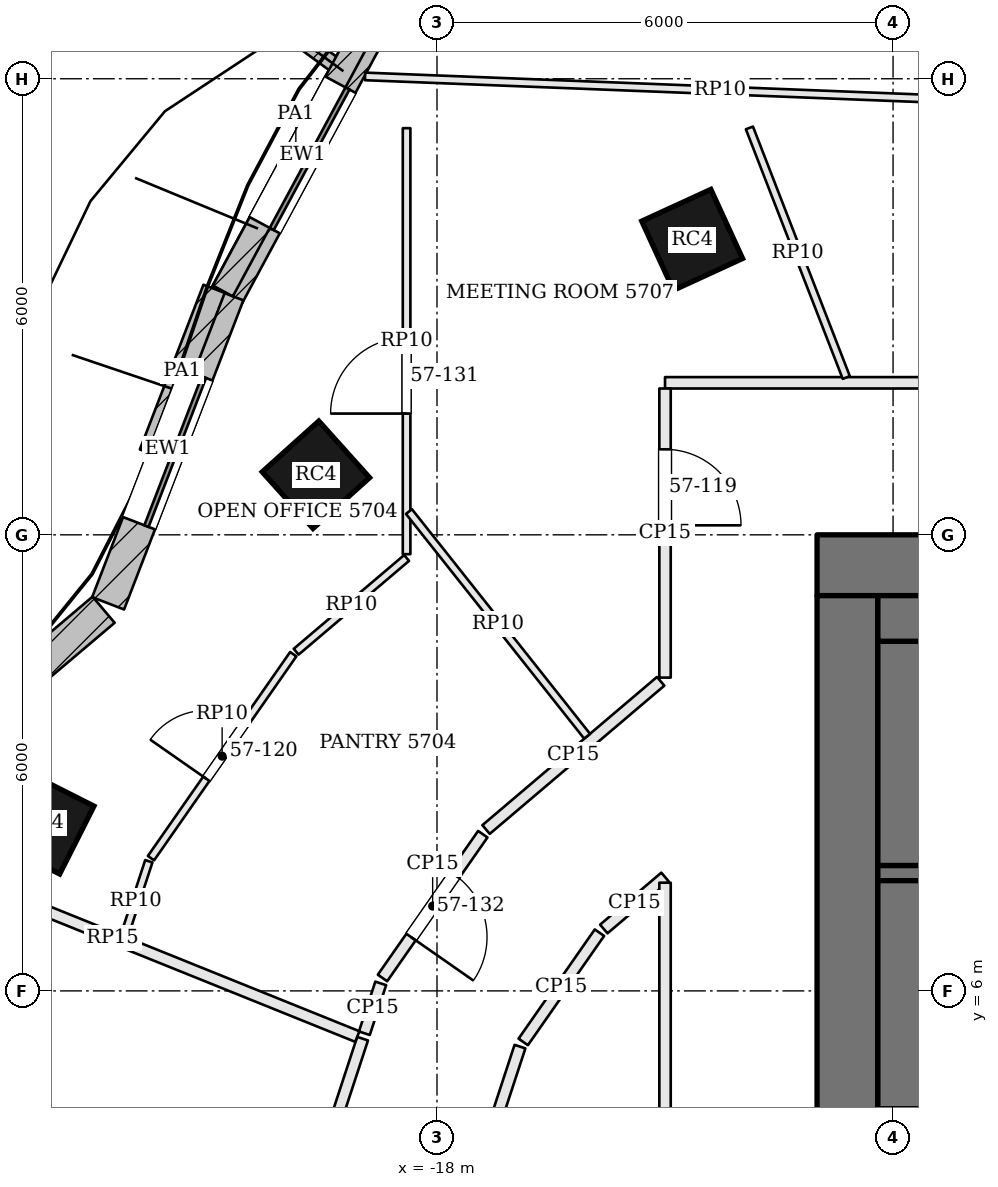
"""IFC4 building model, lengths in metres.
Left out: names, types, materials, properties, quantities, classifications, styles, units other than length and angle.
Written with IfcOpenShell. Run it as: python <this file> out.ifc"""

import sys

from ifc_helpers import new_model, si_unit, direction, frame, frame_2d, origin, origin_2d, place, context, subcontext, project, spatial, rectangle, extrude, element, fill, save


model = new_model("IFC4")
c1 = context("Model", 3, precision=1e-05, world=origin(), true_north=direction((0.0, 1.0)))
c2 = subcontext(c1, "Body", "Model", "MODEL_VIEW")
j1 = project(units=[si_unit("LENGTHUNIT", "METRE"), si_unit("PLANEANGLEUNIT", "RADIAN")], contexts=[c1])
p1 = place(None, origin())
s1 = spatial("IfcSite", under=j1, at=p1, CompositionType="ELEMENT")
p2 = place(p1, origin())
s2 = spatial("IfcBuilding", under=s1, at=p2, CompositionType="ELEMENT")
p3 = place(p2, frame((0.0, 0.0, 233.1)))
s3 = spatial("IfcBuildingStorey", under=s2, at=p3, CompositionType="ELEMENT", Elevation=233.1)
p4 = place(p3, frame((-13.0, 11.6, 0.0), z_axis=(0.0, 0.0, 1.0), x_axis=(1.0, 0.0, 0.0)))
e1 = element("IfcWall", 1, at=p4, inside=s3, PredefinedType="SHEAR", context=c2, shape_type="SweptSolid", body=[
    extrude(rectangle(XDim=26.0, YDim=0.8, at=frame_2d((13.0, 0.0))), origin(), (0.0, 0.0, 1.0), 3.9),
])
p5 = place(p4, frame((8.825, 0.0, 0.0)))
e2 = element("IfcOpeningElement", 2, at=p5, cuts=e1, PredefinedType="OPENING", context=c2, shape_type="SweptSolid", body=[
    extrude(rectangle(XDim=1.0, YDim=2.1, at=frame_2d((0.5, 1.05))), frame((0.0, 0.41, 0.0), z_axis=(0.0, -1.0, 0.0), x_axis=(1.0, 0.0, 0.0)), (0.0, 0.0, 1.0), 0.82),
])
p6 = place(p4, frame((11.825, 0.0, 0.0)))
e3 = element("IfcOpeningElement", 3, at=p6, cuts=e1, PredefinedType="OPENING", context=c2, shape_type="SweptSolid", body=[
    extrude(rectangle(XDim=0.7, YDim=2.1, at=frame_2d((0.35, 1.05))), frame((0.0, 0.41, 0.0), z_axis=(0.0, -1.0, 0.0), x_axis=(1.0, 0.0, 0.0)), (0.0, 0.0, 1.0), 0.82),
])
p7 = place(p4, frame((14.275, 0.0, 0.0)))
e4 = element("IfcOpeningElement", 4, at=p7, cuts=e1, PredefinedType="OPENING", context=c2, shape_type="SweptSolid", body=[
    extrude(rectangle(XDim=0.7, YDim=2.1, at=frame_2d((0.35, 1.05))), frame((0.0, 0.41, 0.0), z_axis=(0.0, -1.0, 0.0), x_axis=(1.0, 0.0, 0.0)), (0.0, 0.0, 1.0), 0.82),
])
p8 = place(p4, frame((16.175, 0.0, 0.0)))
e5 = element("IfcOpeningElement", 5, at=p8, cuts=e1, PredefinedType="OPENING", context=c2, shape_type="SweptSolid", body=[
    extrude(rectangle(XDim=1.0, YDim=2.1, at=frame_2d((0.5, 1.05))), frame((0.0, 0.41, 0.0), z_axis=(0.0, -1.0, 0.0), x_axis=(1.0, 0.0, 0.0)), (0.0, 0.0, 1.0), 0.82),
])
p9 = place(p3, frame((-12.6, -2.2, 0.0), z_axis=(0.0, 0.0, 1.0), x_axis=(0.0, 1.0, 0.0)))
e6 = element("IfcWall", 6, at=p9, inside=s3, PredefinedType="SHEAR", context=c2, shape_type="SweptSolid", body=[
    extrude(rectangle(XDim=13.4, YDim=0.8, at=frame_2d((6.7, 0.0))), origin(), (0.0, 0.0, 1.0), 3.9),
])
p10 = place(p9, frame((4.2, 0.0, 0.0)))
e7 = element("IfcOpeningElement", 7, at=p10, cuts=e6, PredefinedType="OPENING", context=c2, shape_type="SweptSolid", body=[
    extrude(rectangle(XDim=1.8, YDim=2.1, at=frame_2d((0.9, 1.05))), frame((0.0, 0.41, 0.0), z_axis=(0.0, -1.0, 0.0), x_axis=(1.0, 0.0, 0.0)), (0.0, 0.0, 1.0), 0.82),
])
for number, where, z_axis, x_axis in (
    (8, (-14.643, 15.881, 0.0), (0.0, 0.0, 1.0), (-0.909, -0.417, 0.0)),
    (9, (-19.593, 12.79, 0.0), (0.0, 0.0, 1.0), (-0.744, -0.668, 0.0)),
    (10, (-23.185, 8.21, 0.0), (0.0, 0.0, 1.0), (-0.451, -0.893, 0.0)),
):
    element("IfcColumn", number, at=place(p3, frame(where, z_axis=z_axis, x_axis=x_axis)), inside=s3, PredefinedType="COLUMN", context=c2, shape_type="SweptSolid", body=[
        extrude(rectangle(XDim=1.0, YDim=1.0, at=origin_2d()), origin(), (0.0, 0.0, 1.0), 3.9),
    ])
p11 = place(p3, frame((-18.767, 18.854, 0.0), z_axis=(0.0, 0.0, 1.0), x_axis=(-0.474475888716, -0.880268499395, 0.0)))
e11 = element("IfcWall", 11, at=p11, inside=s3, PredefinedType="SOLIDWALL", context=c2, shape_type="SweptSolid", body=[
    extrude(rectangle(XDim=4.219, YDim=0.45, at=frame_2d((2.11, 0.0))), origin(), (0.0, 0.0, 1.0), 3.7),
])
p12 = place(p11, frame((1.06, 0.0, 0.9)))
e12 = element("IfcOpeningElement", 12, at=p12, cuts=e11, PredefinedType="OPENING", context=c2, shape_type="SweptSolid", body=[
    extrude(rectangle(XDim=2.1, YDim=2.3, at=frame_2d((1.05, 1.15))), frame((0.0, 0.235, 0.0), z_axis=(0.0, -1.0, 0.0), x_axis=(1.0, 0.0, 0.0)), (0.0, 0.0, 1.0), 0.47),
])
p13 = place(p3, frame((-20.757, 15.166, 0.0), z_axis=(0.0, 0.0, 1.0), x_axis=(-0.360067043581, -0.932926430179, 0.0)))
e13 = element("IfcWall", 13, at=p13, inside=s3, PredefinedType="SOLIDWALL", context=c2, shape_type="SweptSolid", body=[
    extrude(rectangle(XDim=4.36, YDim=0.45, at=frame_2d((2.18, 0.0))), origin(), (0.0, 0.0, 1.0), 3.7),
])
p14 = place(p13, frame((1.13, 0.0, 0.9)))
e14 = element("IfcOpeningElement", 14, at=p14, cuts=e13, PredefinedType="OPENING", context=c2, shape_type="SweptSolid", body=[
    extrude(rectangle(XDim=2.1, YDim=2.3, at=frame_2d((1.05, 1.15))), frame((0.0, 0.235, 0.0), z_axis=(0.0, -1.0, 0.0), x_axis=(1.0, 0.0, 0.0)), (0.0, 0.0, 1.0), 0.47),
])
p15 = place(p3, frame((-22.386, 11.014, 0.0), z_axis=(0.0, 0.0, 1.0), x_axis=(-0.763569952162, -0.645725118108, 0.0)))
e15 = element("IfcWall", 15, at=p15, inside=s3, PredefinedType="SOLIDWALL", context=c2, shape_type="SweptSolid", body=[
    extrude(rectangle(XDim=4.386, YDim=0.45, at=frame_2d((2.193, 0.0))), origin(), (0.0, 0.0, 1.0), 3.7),
])
p16 = place(p15, frame((1.143, 0.0, 0.9)))
e16 = element("IfcOpeningElement", 16, at=p16, cuts=e15, PredefinedType="OPENING", context=c2, shape_type="SweptSolid", body=[
    extrude(rectangle(XDim=2.1, YDim=2.3, at=frame_2d((1.05, 1.15))), frame((0.0, 0.235, 0.0), z_axis=(0.0, -1.0, 0.0), x_axis=(1.0, 0.0, 0.0)), (0.0, 0.0, 1.0), 0.47),
])
p17 = place(p3, frame((-19.231, 18.099, 0.0), z_axis=(0.0, 0.0, 1.0), x_axis=(-0.806085538754, 0.591799040394, 0.0)))
e17 = element("IfcWall", 17, at=p17, inside=s3, PredefinedType="SOLIDWALL", context=c2, shape_type="SweptSolid", body=[
    extrude(rectangle(XDim=1.75, YDim=0.2, at=frame_2d((0.875, 0.0))), origin(), (0.0, 0.0, 1.0), 3.7),
])
p18 = place(p3, frame((-18.896, 18.773, 3.9), z_axis=(0.0, 0.0, 1.0), x_axis=(-0.474444905835, -0.880285198857, 0.0)))
e18 = element("IfcWall", 18, at=p18, inside=s3, PredefinedType="PARAPET", context=c2, shape_type="SweptSolid", body=[
    extrude(rectangle(XDim=4.05, YDim=0.3, at=frame_2d((2.025, 0.0))), origin(), (0.0, 0.0, 1.0), 1.1),
])
p19 = place(p3, frame((-20.933, 15.237, 3.9), z_axis=(0.0, 0.0, 1.0), x_axis=(-0.360021038217, -0.932944184848, 0.0)))
e19 = element("IfcWall", 19, at=p19, inside=s3, PredefinedType="PARAPET", context=c2, shape_type="SweptSolid", body=[
    extrude(rectangle(XDim=2.323, YDim=0.3, at=frame_2d((1.162, 0.0))), origin(), (0.0, 0.0, 1.0), 1.1),
])
p20 = place(p3, frame((-12.2, 7.525, 0.0), z_axis=(0.0, 0.0, 1.0), x_axis=(1.0, 0.0, 0.0)))
e20 = element("IfcWall", 20, at=p20, inside=s3, PredefinedType="SOLIDWALL", context=c2, shape_type="SweptSolid", body=[
    extrude(rectangle(XDim=7.1, YDim=0.25, at=frame_2d((3.55, 0.0))), origin(), (0.0, 0.0, 1.0), 3.7),
])
p21 = place(p20, frame((5.8, 0.0, 0.0)))
e21 = element("IfcOpeningElement", 21, at=p21, cuts=e20, PredefinedType="OPENING", context=c2, shape_type="SweptSolid", body=[
    extrude(rectangle(XDim=1.2, YDim=2.1, at=frame_2d((0.6, 1.05))), frame((0.0, 0.135, 0.0), z_axis=(0.0, -1.0, 0.0), x_axis=(1.0, 0.0, 0.0)), (0.0, 0.0, 1.0), 0.27),
])
p22 = place(p3, frame((-11.9, 4.45, 0.0), z_axis=(0.0, 0.0, 1.0), x_axis=(0.0, 1.0, 0.0)))
e22 = element("IfcWall", 22, at=p22, inside=s3, PredefinedType="SOLIDWALL", context=c2, shape_type="SweptSolid", body=[
    extrude(rectangle(XDim=3.0, YDim=0.6, at=frame_2d((1.5, 0.0))), origin(), (0.0, 0.0, 1.0), 3.7),
])
p23 = place(p3, frame((-11.9, 7.65, 0.0), z_axis=(0.0, 0.0, 1.0), x_axis=(0.0, 1.0, 0.0)))
e23 = element("IfcWall", 23, at=p23, inside=s3, PredefinedType="SOLIDWALL", context=c2, shape_type="SweptSolid", body=[
    extrude(rectangle(XDim=2.95, YDim=0.6, at=frame_2d((1.475, 0.0))), origin(), (0.0, 0.0, 1.0), 3.7),
])
p24 = place(p3, frame((-12.2, 10.9, 0.0), z_axis=(0.0, 0.0, 1.0), x_axis=(1.0, 0.0, 0.0)))
e24 = element("IfcWall", 24, at=p24, inside=s3, PredefinedType="SOLIDWALL", context=c2, shape_type="SweptSolid", body=[
    extrude(rectangle(XDim=7.1, YDim=0.6, at=frame_2d((3.55, 0.0))), origin(), (0.0, 0.0, 1.0), 3.7),
])
p25 = place(p3, frame((-18.979, 5.372, 0.0), z_axis=(0.0, 0.0, 1.0), x_axis=(-0.311873415846, -0.950123661682, 0.0)))
e25 = element("IfcWall", 25, at=p25, inside=s3, PredefinedType="PARTITIONING", context=c2, shape_type="SweptSolid", body=[
    extrude(rectangle(XDim=2.441, YDim=0.15, at=frame_2d((1.22, 0.0))), origin(), (0.0, 0.0, 1.0), 3.084),
])
p26 = place(p3, frame((-25.486, 7.995, 0.0), z_axis=(0.0, 0.0, 1.0), x_axis=(0.927464099257, -0.373912215083, 0.0)))
e26 = element("IfcWall", 26, at=p26, inside=s3, PredefinedType="PARTITIONING", context=c2, shape_type="SweptSolid", body=[
    extrude(rectangle(XDim=6.941, YDim=0.15, at=frame_2d((3.47, 0.0))), origin(), (0.0, 0.0, 1.0), 3.084),
])
p27 = place(p3, frame((-2.837, 14.0, 0.0), z_axis=(0.0, 0.0, 1.0), x_axis=(-1.0, 0.0, 0.0)))
e27 = element("IfcWall", 27, at=p27, inside=s3, PredefinedType="PARTITIONING", context=c2, shape_type="SweptSolid", body=[
    extrude(rectangle(XDim=12.163, YDim=0.15, at=frame_2d((6.082, 0.0))), origin(), (0.0, 0.0, 1.0), 3.084),
])
p28 = place(p27, frame((3.938, 0.0, 0.0)))
e28 = element("IfcOpeningElement", 28, at=p28, cuts=e27, PredefinedType="OPENING", context=c2, shape_type="SweptSolid", body=[
    extrude(rectangle(XDim=1.8, YDim=2.1, at=frame_2d((0.9, 1.05))), frame((0.0, 0.085, 0.0), z_axis=(0.0, -1.0, 0.0), x_axis=(1.0, 0.0, 0.0)), (0.0, 0.0, 1.0), 0.17),
])
p29 = place(p3, frame((-15.0, 13.925, 0.0), z_axis=(0.0, 0.0, 1.0), x_axis=(0.0, -1.0, 0.0)))
e29 = element("IfcWall", 29, at=p29, inside=s3, PredefinedType="PARTITIONING", context=c2, shape_type="SweptSolid", body=[
    extrude(rectangle(XDim=3.803, YDim=0.15, at=frame_2d((1.902, 0.0))), origin(), (0.0, 0.0, 1.0), 3.084),
])
p30 = place(p29, frame((0.8, 0.0, 0.0)))
e30 = element("IfcOpeningElement", 30, at=p30, cuts=e29, PredefinedType="OPENING", context=c2, shape_type="SweptSolid", body=[
    extrude(rectangle(XDim=1.0, YDim=2.4, at=frame_2d((0.5, 1.2))), frame((0.0, 0.085, 0.0), z_axis=(0.0, -1.0, 0.0), x_axis=(1.0, 0.0, 0.0)), (0.0, 0.0, 1.0), 0.17),
])
p31 = place(p3, frame((-15.057, 10.073, 0.0), z_axis=(0.0, 0.0, 1.0), x_axis=(-0.762398905861, -0.647107339119, 0.0)))
e31 = element("IfcWall", 31, at=p31, inside=s3, PredefinedType="PARTITIONING", context=c2, shape_type="SweptSolid", body=[
    extrude(rectangle(XDim=3.013, YDim=0.15, at=frame_2d((1.507, 0.0))), origin(), (0.0, 0.0, 1.0), 3.084),
])
p32 = place(p3, frame((-17.397, 8.062, 0.0), z_axis=(0.0, 0.0, 1.0), x_axis=(-0.572118665737, -0.820170855563, 0.0)))
e32 = element("IfcWall", 32, at=p32, inside=s3, PredefinedType="PARTITIONING", context=c2, shape_type="SweptSolid", body=[
    extrude(rectangle(XDim=2.306, YDim=0.15, at=frame_2d((1.153, 0.0))), origin(), (0.0, 0.0, 1.0), 3.084),
])
p33 = place(p32, frame((0.65, 0.0, 0.0)))
e33 = element("IfcOpeningElement", 33, at=p33, cuts=e32, PredefinedType="OPENING", context=c2, shape_type="SweptSolid", body=[
    extrude(rectangle(XDim=1.0, YDim=2.1, at=frame_2d((0.5, 1.05))), frame((0.0, 0.085, 0.0), z_axis=(0.0, -1.0, 0.0), x_axis=(1.0, 0.0, 0.0)), (0.0, 0.0, 1.0), 0.17),
])
p34 = place(p3, frame((-18.74, 6.099, 0.0), z_axis=(0.0, 0.0, 1.0), x_axis=(-0.311875163268, -0.950123088098, 0.0)))
e34 = element("IfcWall", 34, at=p34, inside=s3, PredefinedType="PARTITIONING", context=c2, shape_type="SweptSolid", body=[
    extrude(rectangle(XDim=0.69, YDim=0.15, at=frame_2d((0.345, 0.0))), origin(), (0.0, 0.0, 1.0), 3.084),
])
p35 = place(p3, frame((-17.739, 2.738, 0.0), z_axis=(0.0, 0.0, 1.0), x_axis=(0.311904957484, 0.950113307715, 0.0)))
e35 = element("IfcWall", 35, at=p35, inside=s3, PredefinedType="PARTITIONING", context=c2, shape_type="SweptSolid", body=[
    extrude(rectangle(XDim=2.662, YDim=0.15, at=frame_2d((1.331, 0.0))), origin(), (0.0, 0.0, 1.0), 3.084),
])
p36 = place(p3, frame((-16.865, 5.329, 0.0), z_axis=(0.0, 0.0, 1.0), x_axis=(0.572096615639, 0.820186236397, 0.0)))
e36 = element("IfcWall", 36, at=p36, inside=s3, PredefinedType="PARTITIONING", context=c2, shape_type="SweptSolid", body=[
    extrude(rectangle(XDim=1.753, YDim=0.15, at=frame_2d((0.876, 0.0))), origin(), (0.0, 0.0, 1.0), 3.084),
])
p37 = place(p3, frame((-15.805, 6.814, 0.0), z_axis=(0.0, 0.0, 1.0), x_axis=(0.762298381233, 0.647225755027, 0.0)))
e37 = element("IfcWall", 37, at=p37, inside=s3, PredefinedType="PARTITIONING", context=c2, shape_type="SweptSolid", body=[
    extrude(rectangle(XDim=1.057, YDim=0.15, at=frame_2d((0.528, 0.0))), origin(), (0.0, 0.0, 1.0), 3.084),
])
p38 = place(p3, frame((-15.0, 7.423, 0.0), z_axis=(0.0, 0.0, 1.0), x_axis=(0.0, -1.0, 0.0)))
e38 = element("IfcWall", 38, at=p38, inside=s3, PredefinedType="PARTITIONING", context=c2, shape_type="SweptSolid", body=[
    extrude(rectangle(XDim=12.423, YDim=0.15, at=frame_2d((6.211, 0.0))), origin(), (0.0, 0.0, 1.0), 3.084),
])
p39 = place(p38, frame((5.174, 0.0, 0.0)))
e39 = element("IfcOpeningElement", 39, at=p39, cuts=e38, PredefinedType="OPENING", context=c2, shape_type="SweptSolid", body=[
    extrude(rectangle(XDim=1.0, YDim=2.1, at=frame_2d((0.5, 1.05))), frame((0.0, 0.085, 0.0), z_axis=(0.0, -1.0, 0.0), x_axis=(1.0, 0.0, 0.0)), (0.0, 0.0, 1.0), 0.17),
])
p40 = place(p3, frame((-18.946, 18.031, 0.0), z_axis=(0.0, 0.0, 1.0), x_axis=(0.999224475149, -0.039375731905, 0.0)))
e40 = element("IfcWall", 40, at=p40, inside=s3, PredefinedType="PARTITIONING", context=c2, shape_type="SweptSolid", body=[
    extrude(rectangle(XDim=9.35, YDim=0.1, at=frame_2d((4.675, 0.0))), origin(), (0.0, 0.0, 1.0), 3.084),
])
p41 = place(p3, frame((-22.133, 6.665, 0.0), z_axis=(0.0, 0.0, 1.0), x_axis=(0.311877335249, 0.950122375148, 0.0)))
e41 = element("IfcWall", 41, at=p41, inside=s3, PredefinedType="PARTITIONING", context=c2, shape_type="SweptSolid", body=[
    extrude(rectangle(XDim=1.095, YDim=0.1, at=frame_2d((0.548, 0.0))), origin(), (0.0, 0.0, 1.0), 3.084),
])
p42 = place(p3, frame((-21.763, 7.746, 0.0), z_axis=(0.0, 0.0, 1.0), x_axis=(0.57207420081, 0.820201870741, 0.0)))
e42 = element("IfcWall", 42, at=p42, inside=s3, PredefinedType="PARTITIONING", context=c2, shape_type="SweptSolid", body=[
    extrude(rectangle(XDim=3.271, YDim=0.1, at=frame_2d((1.636, 0.0))), origin(), (0.0, 0.0, 1.0), 3.084),
])
p43 = place(p42, frame((1.273, 0.0, 0.0)))
e43 = element("IfcOpeningElement", 43, at=p43, cuts=e42, PredefinedType="OPENING", context=c2, shape_type="SweptSolid", body=[
    extrude(rectangle(XDim=0.9, YDim=2.1, at=frame_2d((0.45, 1.05))), frame((0.0, 0.06, 0.0), z_axis=(0.0, -1.0, 0.0), x_axis=(1.0, 0.0, 0.0)), (0.0, 0.0, 1.0), 0.12),
])
p44 = place(p3, frame((-19.853, 10.462, 0.0), z_axis=(0.0, 0.0, 1.0), x_axis=(0.762403788971, 0.647101585968, 0.0)))
e44 = element("IfcWall", 44, at=p44, inside=s3, PredefinedType="PARTITIONING", context=c2, shape_type="SweptSolid", body=[
    extrude(rectangle(XDim=1.906, YDim=0.1, at=frame_2d((0.953, 0.0))), origin(), (0.0, 0.0, 1.0), 3.084),
])
p45 = place(p3, frame((-18.4, 11.745, 0.0), z_axis=(0.0, 0.0, 1.0), x_axis=(0.0, 1.0, 0.0)))
e45 = element("IfcWall", 45, at=p45, inside=s3, PredefinedType="PARTITIONING", context=c2, shape_type="SweptSolid", body=[
    extrude(rectangle(XDim=5.605, YDim=0.1, at=frame_2d((2.802, 0.0))), origin(), (0.0, 0.0, 1.0), 3.084),
])
p46 = place(p45, frame((1.85, 0.0, 0.0)))
e46 = element("IfcOpeningElement", 46, at=p46, cuts=e45, PredefinedType="OPENING", context=c2, shape_type="SweptSolid", body=[
    extrude(rectangle(XDim=1.0, YDim=2.4, at=frame_2d((0.5, 1.2))), frame((0.0, 0.06, 0.0), z_axis=(0.0, -1.0, 0.0), x_axis=(1.0, 0.0, 0.0)), (0.0, 0.0, 1.0), 0.12),
])
p47 = place(p3, frame((-12.615, 14.07, 0.0), z_axis=(0.0, 0.0, 1.0), x_axis=(-0.361750417315, 0.932274978519, 0.0)))
e47 = element("IfcWall", 47, at=p47, inside=s3, PredefinedType="PARTITIONING", context=c2, shape_type="SweptSolid", body=[
    extrude(rectangle(XDim=3.522, YDim=0.1, at=frame_2d((1.761, 0.0))), origin(), (0.0, 0.0, 1.0), 3.084),
])
p48 = place(p3, frame((-16.025, 9.35, 0.0), z_axis=(0.0, 0.0, 1.0), x_axis=(-0.62135087232, 0.783532445702, 0.0)))
e48 = element("IfcWall", 48, at=p48, inside=s3, PredefinedType="PARTITIONING", context=c2, shape_type="SweptSolid", body=[
    extrude(rectangle(XDim=3.772, YDim=0.1, at=frame_2d((1.886, 0.0))), origin(), (0.0, 0.0, 1.0), 3.084),
])
p49 = place(p12, origin())
e49 = element("IfcWindow", 49, at=p49, inside=s3, PartitioningType="SINGLE_PANEL", PredefinedType="WINDOW", context=c2, shape_type="SweptSolid", body=[
    extrude(rectangle(XDim=2.1, YDim=2.3, at=frame_2d((1.05, 1.15))), frame((0.0, 0.135, 0.0), z_axis=(0.0, -1.0, 0.0), x_axis=(1.0, 0.0, 0.0)), (0.0, 0.0, 1.0), 0.06),
])
fill(e12, e49)
p50 = place(p14, origin())
e50 = element("IfcWindow", 50, at=p50, inside=s3, PartitioningType="SINGLE_PANEL", PredefinedType="WINDOW", context=c2, shape_type="SweptSolid", body=[
    extrude(rectangle(XDim=2.1, YDim=2.3, at=frame_2d((1.05, 1.15))), frame((0.0, 0.135, 0.0), z_axis=(0.0, -1.0, 0.0), x_axis=(1.0, 0.0, 0.0)), (0.0, 0.0, 1.0), 0.06),
])
fill(e14, e50)
p51 = place(p30, origin())
e51 = element("IfcDoor", 51, at=p51, inside=s3, OperationType="SINGLE_SWING_RIGHT", PredefinedType="DOOR", context=c2, shape_type="SweptSolid", body=[
    extrude(rectangle(XDim=1.0, YDim=2.4, at=frame_2d((0.5, 1.2))), frame((0.0, 0.025, 0.0), z_axis=(0.0, -1.0, 0.0), x_axis=(1.0, 0.0, 0.0)), (0.0, 0.0, 1.0), 0.05),
])
fill(e30, e51)
p52 = place(p43, origin())
e52 = element("IfcDoor", 52, at=p52, inside=s3, OperationType="SINGLE_SWING_LEFT", PredefinedType="DOOR", context=c2, shape_type="SweptSolid", body=[
    extrude(rectangle(XDim=0.9, YDim=2.1, at=frame_2d((0.45, 1.05))), frame((0.0, 0.025, 0.0), z_axis=(0.0, -1.0, 0.0), x_axis=(1.0, 0.0, 0.0)), (0.0, 0.0, 1.0), 0.05),
])
fill(e43, e52)
p53 = place(p46, origin())
e53 = element("IfcDoor", 53, at=p53, inside=s3, OperationType="SINGLE_SWING_LEFT", PredefinedType="DOOR", context=c2, shape_type="SweptSolid", body=[
    extrude(rectangle(XDim=1.0, YDim=2.4, at=frame_2d((0.5, 1.2))), frame((0.0, 0.025, 0.0), z_axis=(0.0, -1.0, 0.0), x_axis=(1.0, 0.0, 0.0)), (0.0, 0.0, 1.0), 0.05),
])
fill(e46, e53)
p54 = place(p33, origin())
e54 = element("IfcDoor", 54, at=p54, inside=s3, OperationType="SINGLE_SWING_RIGHT", PredefinedType="DOOR", context=c2, shape_type="SweptSolid", body=[
    extrude(rectangle(XDim=1.0, YDim=2.1, at=frame_2d((0.5, 1.05))), frame((0.0, 0.025, 0.0), z_axis=(0.0, -1.0, 0.0), x_axis=(1.0, 0.0, 0.0)), (0.0, 0.0, 1.0), 0.05),
])
fill(e33, e54)
save(model, sys.argv[1])
